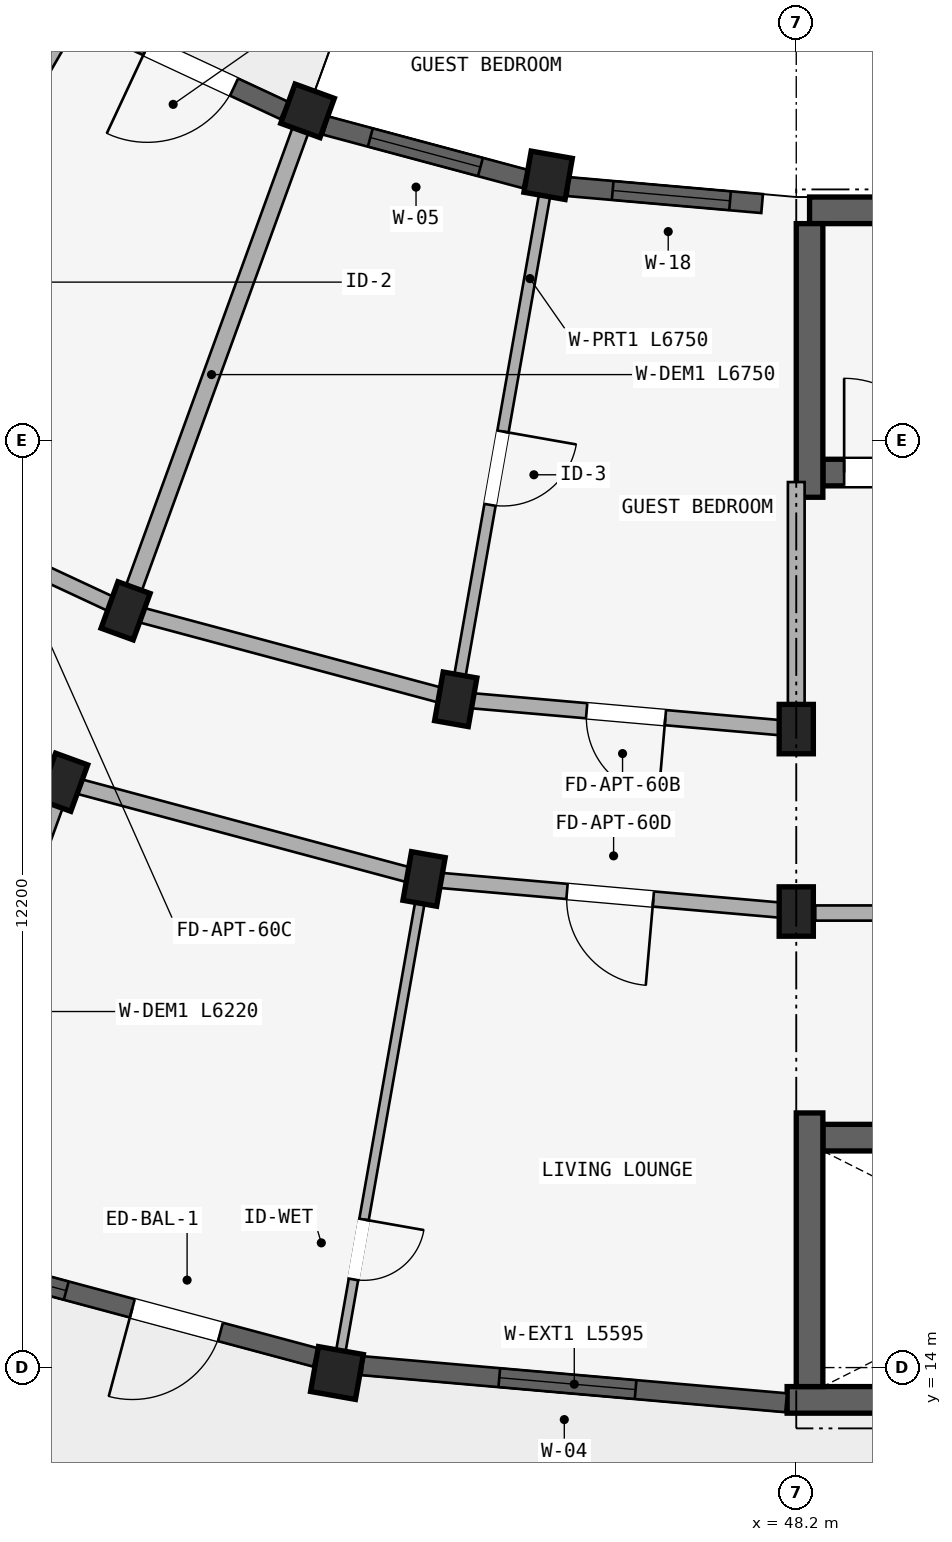
"""IFC4 building model, lengths in metres.
Left out: names, types, materials, properties, quantities, classifications, styles, units other than length and angle.
Written with IfcOpenShell. Run it as: python <this file> out.ifc"""

import sys

from ifc_helpers import new_model, si_unit, direction, frame, frame_2d, origin, origin_2d, place, context, subcontext, project, spatial, rectangle, extrude, element, fill, save


model = new_model("IFC4")
c1 = context("Model", 3, precision=1e-05, world=origin(), true_north=direction((0.0, 1.0)))
c2 = subcontext(c1, "Body", "Model", "MODEL_VIEW")
j1 = project(units=[si_unit("LENGTHUNIT", "METRE"), si_unit("PLANEANGLEUNIT", "RADIAN")], contexts=[c1])
p1 = place(None, origin())
s1 = spatial("IfcSite", under=j1, at=p1, CompositionType="ELEMENT")
p2 = place(p1, origin())
s2 = spatial("IfcBuilding", under=s1, at=p2, CompositionType="ELEMENT")
p3 = place(p2, frame((0.0, 0.0, 30.75)))
s3 = spatial("IfcBuildingStorey", under=s2, at=p3, CompositionType="ELEMENT", Elevation=30.75)
p4 = place(p3, frame((48.08, 13.575, 0.0), z_axis=(0.0, 0.0, 1.0), x_axis=(1.0, 0.0, 0.0)))
e1 = element("IfcWall", 1, at=p4, inside=s3, PredefinedType="SHEAR", context=c2, shape_type="SweptSolid", body=[
    extrude(rectangle(XDim=8.545, YDim=0.35, at=frame_2d((4.272, 0.0))), origin(), (0.0, 0.0, 1.0), 2.91),
])
p5 = place(p3, frame((48.55, 17.025, 0.0), z_axis=(0.0, 0.0, 1.0), x_axis=(1.0, 0.0, 0.0)))
e2 = element("IfcWall", 2, at=p5, inside=s3, PredefinedType="SHEAR", context=c2, shape_type="SweptSolid", body=[
    extrude(rectangle(XDim=8.075, YDim=0.35, at=frame_2d((4.038, 0.0))), origin(), (0.0, 0.0, 1.0), 2.91),
])
p6 = place(p5, frame((6.38, 0.0, 0.0)))
e3 = element("IfcOpeningElement", 3, at=p6, cuts=e2, PredefinedType="OPENING", context=c2, shape_type="SweptSolid", body=[
    extrude(rectangle(XDim=1.24, YDim=2.15, at=frame_2d((0.62, 1.075))), frame((0.0, 0.185, 0.0), z_axis=(0.0, -1.0, 0.0), x_axis=(1.0, 0.0, 0.0)), (0.0, 0.0, 1.0), 0.37),
])
p7 = place(p3, frame((48.375, 17.35, 0.0), z_axis=(0.0, 0.0, 1.0), x_axis=(0.0, -1.0, 0.0)))
e4 = element("IfcWall", 4, at=p7, inside=s3, PredefinedType="SHEAR", context=c2, shape_type="SweptSolid", body=[
    extrude(rectangle(XDim=3.6, YDim=0.35, at=frame_2d((1.8, 0.0))), origin(), (0.0, 0.0, 1.0), 2.91),
])
p8 = place(p3, frame((48.375, 29.225, 0.0), z_axis=(0.0, 0.0, 1.0), x_axis=(1.0, 0.0, 0.0)))
e5 = element("IfcWall", 5, at=p8, inside=s3, PredefinedType="SHEAR", context=c2, shape_type="SweptSolid", body=[
    extrude(rectangle(XDim=8.25, YDim=0.35, at=frame_2d((4.125, 0.0))), origin(), (0.0, 0.0, 1.0), 2.91),
])
p9 = place(p3, frame((48.55, 25.775, 0.0), z_axis=(0.0, 0.0, 1.0), x_axis=(1.0, 0.0, 0.0)))
e6 = element("IfcWall", 6, at=p9, inside=s3, PredefinedType="SHEAR", context=c2, shape_type="SweptSolid", body=[
    extrude(rectangle(XDim=7.9, YDim=0.35, at=frame_2d((3.95, 0.0))), origin(), (0.0, 0.0, 1.0), 2.91),
])
p10 = place(p9, frame((0.28, 0.0, 0.0)))
e7 = element("IfcOpeningElement", 7, at=p10, cuts=e6, PredefinedType="OPENING", context=c2, shape_type="SweptSolid", body=[
    extrude(rectangle(XDim=1.24, YDim=2.15, at=frame_2d((0.62, 1.075))), frame((0.0, 0.185, 0.0), z_axis=(0.0, -1.0, 0.0), x_axis=(1.0, 0.0, 0.0)), (0.0, 0.0, 1.0), 0.37),
])
p11 = place(p3, frame((48.375, 29.05, 0.0), z_axis=(0.0, 0.0, 1.0), x_axis=(0.0, -1.0, 0.0)))
e8 = element("IfcWall", 8, at=p11, inside=s3, PredefinedType="SHEAR", context=c2, shape_type="SweptSolid", body=[
    extrude(rectangle(XDim=3.6, YDim=0.35, at=frame_2d((1.8, 0.0))), origin(), (0.0, 0.0, 1.0), 2.91),
])
for number, where, z_axis, x_axis in (
    (9, (48.2, 22.4, 0.0), (0.0, 0.0, 1.0), (1.0, 0.0, 0.0)),
    (10, (48.2, 20.0, 0.0), (0.0, 0.0, 1.0), (1.0, 0.0, 0.0)),
):
    element("IfcColumn", number, at=place(p3, frame(where, z_axis=z_axis, x_axis=x_axis)), inside=s3, PredefinedType="COLUMN", context=c2, shape_type="SweptSolid", body=[
        extrude(rectangle(XDim=0.45, YDim=0.65, at=origin_2d()), origin(), (0.0, 0.0, 1.0), 2.91),
    ])
p12 = place(p3, frame((44.935, 29.686, 0.0), z_axis=(0.0, 0.0, 1.0), x_axis=(-0.984807753012, 0.173648177667, 0.0)))
e11 = element("IfcColumn", 11, at=p12, inside=s3, PredefinedType="COLUMN", context=c2, shape_type="SweptSolid", body=[
    extrude(rectangle(XDim=0.55, YDim=0.55, at=origin_2d()), origin(), (0.0, 0.0, 1.0), 2.91),
])
for number, where, z_axis, x_axis in (
    (12, (43.72, 22.792, 0.0), (0.0, 0.0, 1.0), (-0.985, 0.174, 0.0)),
    (13, (43.303, 20.428, 0.0), (0.0, 0.0, 1.0), (-0.985, 0.174, 0.0)),
):
    element("IfcColumn", number, at=place(p3, frame(where, z_axis=z_axis, x_axis=x_axis)), inside=s3, PredefinedType="COLUMN", context=c2, shape_type="SweptSolid", body=[
        extrude(rectangle(XDim=0.45, YDim=0.65, at=origin_2d()), origin(), (0.0, 0.0, 1.0), 2.91),
    ])
p13 = place(p3, frame((42.157, 13.929, 0.0), z_axis=(0.0, 0.0, 1.0), x_axis=(-0.984807753012, 0.173648177667, 0.0)))
e14 = element("IfcColumn", 14, at=p13, inside=s3, PredefinedType="COLUMN", context=c2, shape_type="SweptSolid", body=[
    extrude(rectangle(XDim=0.6, YDim=0.6, at=origin_2d()), origin(), (0.0, 0.0, 1.0), 2.91),
])
p14 = place(p3, frame((41.77, 30.534, 0.0), z_axis=(0.0, 0.0, 1.0), x_axis=(-0.939692620786, 0.342020143326, 0.0)))
e15 = element("IfcColumn", 15, at=p14, inside=s3, PredefinedType="COLUMN", context=c2, shape_type="SweptSolid", body=[
    extrude(rectangle(XDim=0.55, YDim=0.55, at=origin_2d()), origin(), (0.0, 0.0, 1.0), 2.91),
])
for number, where, z_axis, x_axis in (
    (16, (39.376, 23.956, 0.0), (0.0, 0.0, 1.0), (-0.94, 0.342, 0.0)),
    (17, (38.555, 21.701, 0.0), (0.0, 0.0, 1.0), (-0.94, 0.342, 0.0)),
):
    element("IfcColumn", number, at=place(p3, frame(where, z_axis=z_axis, x_axis=x_axis)), inside=s3, PredefinedType="COLUMN", context=c2, shape_type="SweptSolid", body=[
        extrude(rectangle(XDim=0.45, YDim=0.65, at=origin_2d()), origin(), (0.0, 0.0, 1.0), 2.91),
    ])
p15 = place(p3, frame((48.45, 19.98, 0.0), z_axis=(0.0, 0.0, 1.0), x_axis=(1.0, 0.0, 0.0)))
e18 = element("IfcWall", 18, at=p15, inside=s3, PredefinedType="STANDARD", context=c2, shape_type="SweptSolid", body=[
    extrude(rectangle(XDim=5.25, YDim=0.2, at=frame_2d((2.625, 0.0))), origin(), (0.0, 0.0, 1.0), 2.352),
])
p16 = place(p15, frame((2.165, 0.0, 0.0)))
e19 = element("IfcOpeningElement", 19, at=p16, cuts=e18, PredefinedType="OPENING", context=c2, shape_type="SweptSolid", body=[
    extrude(rectangle(XDim=0.92, YDim=2.1, at=frame_2d((0.46, 1.05))), frame((0.0, 0.11, 0.0), z_axis=(0.0, -1.0, 0.0), x_axis=(1.0, 0.0, 0.0)), (0.0, 0.0, 1.0), 0.22),
])
p17 = place(p3, frame((48.2, 22.4, 0.0), z_axis=(0.0, 0.0, 1.0), x_axis=(-0.996191949488, 0.087187153726, 0.0)))
e20 = element("IfcWall", 20, at=p17, inside=s3, PredefinedType="STANDARD", context=c2, shape_type="SweptSolid", body=[
    extrude(rectangle(XDim=4.497, YDim=0.2, at=frame_2d((2.249, 0.0))), origin(), (0.0, 0.0, 1.0), 2.352),
])
p18 = place(p17, frame((1.729, 0.0, 0.0)))
e21 = element("IfcOpeningElement", 21, at=p18, cuts=e20, PredefinedType="OPENING", context=c2, shape_type="SweptSolid", body=[
    extrude(rectangle(XDim=1.04, YDim=2.15, at=frame_2d((0.52, 1.075))), frame((0.0, 0.11, 0.0), z_axis=(0.0, -1.0, 0.0), x_axis=(1.0, 0.0, 0.0)), (0.0, 0.0, 1.0), 0.22),
])
p19 = place(p3, frame((48.2, 20.0, 0.0), z_axis=(0.0, 0.0, 1.0), x_axis=(-0.996193663584, 0.087167566415, 0.0)))
e22 = element("IfcWall", 22, at=p19, inside=s3, PredefinedType="STANDARD", context=c2, shape_type="SweptSolid", body=[
    extrude(rectangle(XDim=4.916, YDim=0.2, at=frame_2d((2.458, 0.0))), origin(), (0.0, 0.0, 1.0), 2.352),
])
p20 = place(p19, frame((1.888, 0.0, 0.0)))
e23 = element("IfcOpeningElement", 23, at=p20, cuts=e22, PredefinedType="OPENING", context=c2, shape_type="SweptSolid", body=[
    extrude(rectangle(XDim=1.14, YDim=2.15, at=frame_2d((0.57, 1.075))), frame((0.0, 0.11, 0.0), z_axis=(0.0, -1.0, 0.0), x_axis=(1.0, 0.0, 0.0)), (0.0, 0.0, 1.0), 0.22),
])
p21 = place(p3, frame((43.72, 22.792, 0.0), z_axis=(0.0, 0.0, 1.0), x_axis=(-0.965934240054, 0.258787642463, 0.0)))
e24 = element("IfcWall", 24, at=p21, inside=s3, PredefinedType="STANDARD", context=c2, shape_type="SweptSolid", body=[
    extrude(rectangle(XDim=4.497, YDim=0.2, at=frame_2d((2.249, 0.0))), origin(), (0.0, 0.0, 1.0), 2.352),
])
p22 = place(p3, frame((43.303, 20.428, 0.0), z_axis=(0.0, 0.0, 1.0), x_axis=(-0.965930095386, 0.258803112091, 0.0)))
e25 = element("IfcWall", 25, at=p22, inside=s3, PredefinedType="STANDARD", context=c2, shape_type="SweptSolid", body=[
    extrude(rectangle(XDim=4.916, YDim=0.2, at=frame_2d((2.458, 0.0))), origin(), (0.0, 0.0, 1.0), 2.352),
])
p23 = place(p3, frame((39.376, 23.956, 0.0), z_axis=(0.0, 0.0, 1.0), x_axis=(-0.906307919131, 0.422617978463, 0.0)))
e26 = element("IfcWall", 26, at=p23, inside=s3, PredefinedType="STANDARD", context=c2, shape_type="SweptSolid", body=[
    extrude(rectangle(XDim=4.497, YDim=0.2, at=frame_2d((2.249, 0.0))), origin(), (0.0, 0.0, 1.0), 2.352),
])
p24 = place(p23, frame((1.709, 0.0, 0.0)))
e27 = element("IfcOpeningElement", 27, at=p24, cuts=e26, PredefinedType="OPENING", context=c2, shape_type="SweptSolid", body=[
    extrude(rectangle(XDim=1.08, YDim=2.15, at=frame_2d((0.54, 1.075))), frame((0.0, 0.11, 0.0), z_axis=(0.0, -1.0, 0.0), x_axis=(1.0, 0.0, 0.0)), (0.0, 0.0, 1.0), 0.22),
])
p25 = place(p3, frame((38.555, 21.701, 0.0), z_axis=(0.0, 0.0, 1.0), x_axis=(-0.906302381024, 0.422629854778, 0.0)))
e28 = element("IfcWall", 28, at=p25, inside=s3, PredefinedType="STANDARD", context=c2, shape_type="SweptSolid", body=[
    extrude(rectangle(XDim=4.915, YDim=0.2, at=frame_2d((2.458, 0.0))), origin(), (0.0, 0.0, 1.0), 2.352),
])
p26 = place(p25, frame((1.958, 0.0, 0.0)))
e29 = element("IfcOpeningElement", 29, at=p26, cuts=e28, PredefinedType="OPENING", context=c2, shape_type="SweptSolid", body=[
    extrude(rectangle(XDim=1.0, YDim=2.15, at=frame_2d((0.5, 1.075))), frame((0.0, 0.11, 0.0), z_axis=(0.0, -1.0, 0.0), x_axis=(1.0, 0.0, 0.0)), (0.0, 0.0, 1.0), 0.22),
])
p27 = place(p3, frame((48.2, 25.65, 0.0), z_axis=(0.0, 0.0, 1.0), x_axis=(0.0, -1.0, 0.0)))
e30 = element("IfcWall", 30, at=p27, inside=s3, PredefinedType="STANDARD", context=c2, shape_type="SweptSolid", body=[
    extrude(rectangle(XDim=3.2, YDim=0.22, at=frame_2d((1.6, 0.0))), origin(), (0.0, 0.0, 1.0), 2.352),
])
p28 = place(p3, frame((44.901, 29.489, 0.0), z_axis=(0.0, 0.0, 1.0), x_axis=(-0.173647089161, -0.984807944945, 0.0)))
e31 = element("IfcWall", 31, at=p28, inside=s3, PredefinedType="PARTITIONING", context=c2, shape_type="SweptSolid", body=[
    extrude(rectangle(XDim=6.75, YDim=0.15, at=frame_2d((3.375, 0.0))), origin(), (0.0, 0.0, 1.0), 2.352),
])
p29 = place(p28, frame((3.222, 0.0, 0.0)))
e32 = element("IfcOpeningElement", 32, at=p29, cuts=e31, PredefinedType="OPENING", context=c2, shape_type="SweptSolid", body=[
    extrude(rectangle(XDim=0.98, YDim=2.12, at=frame_2d((0.49, 1.06))), frame((0.0, 0.085, 0.0), z_axis=(0.0, -1.0, 0.0), x_axis=(1.0, 0.0, 0.0)), (0.0, 0.0, 1.0), 0.17),
])
p30 = place(p3, frame((43.286, 20.33, 0.0), z_axis=(0.0, 0.0, 1.0), x_axis=(-0.173646504755, -0.98480804799, 0.0)))
e33 = element("IfcWall", 33, at=p30, inside=s3, PredefinedType="PARTITIONING", context=c2, shape_type="SweptSolid", body=[
    extrude(rectangle(XDim=6.22, YDim=0.125, at=frame_2d((3.11, 0.0))), origin(), (0.0, 0.0, 1.0), 2.352),
])
p31 = place(p30, frame((4.45, 0.0, 0.0)))
e34 = element("IfcOpeningElement", 34, at=p31, cuts=e33, PredefinedType="OPENING", context=c2, shape_type="SweptSolid", body=[
    extrude(rectangle(XDim=0.8, YDim=2.1, at=frame_2d((0.4, 1.05))), frame((0.0, 0.073, 0.0), z_axis=(0.0, -1.0, 0.0), x_axis=(1.0, 0.0, 0.0)), (0.0, 0.0, 1.0), 0.145),
])
p32 = place(p3, frame((41.702, 30.346, 0.0), z_axis=(0.0, 0.0, 1.0), x_axis=(-0.342010221662, -0.939696231917, 0.0)))
e35 = element("IfcWall", 35, at=p32, inside=s3, PredefinedType="STANDARD", context=c2, shape_type="SweptSolid", body=[
    extrude(rectangle(XDim=6.75, YDim=0.22, at=frame_2d((3.375, 0.0))), origin(), (0.0, 0.0, 1.0), 2.352),
])
p33 = place(p3, frame((38.521, 21.607, 0.0), z_axis=(0.0, 0.0, 1.0), x_axis=(-0.341992021352, -0.939702855871, 0.0)))
e36 = element("IfcWall", 36, at=p33, inside=s3, PredefinedType="STANDARD", context=c2, shape_type="SweptSolid", body=[
    extrude(rectangle(XDim=6.22, YDim=0.22, at=frame_2d((3.11, 0.0))), origin(), (0.0, 0.0, 1.0), 2.352),
])
p34 = place(p3, frame((38.7, 31.746, 0.0), z_axis=(0.0, 0.0, 1.0), x_axis=(-0.499997969693, -0.866026575979, 0.0)))
e37 = element("IfcWall", 37, at=p34, inside=s3, PredefinedType="PARTITIONING", context=c2, shape_type="SweptSolid", body=[
    extrude(rectangle(XDim=6.75, YDim=0.15, at=frame_2d((3.375, 0.0))), origin(), (0.0, 0.0, 1.0), 2.352),
])
p35 = place(p34, frame((3.242, 0.0, 0.0)))
e38 = element("IfcOpeningElement", 38, at=p35, cuts=e37, PredefinedType="OPENING", context=c2, shape_type="SweptSolid", body=[
    extrude(rectangle(XDim=0.94, YDim=2.1, at=frame_2d((0.47, 1.05))), frame((0.0, 0.085, 0.0), z_axis=(0.0, -1.0, 0.0), x_axis=(1.0, 0.0, 0.0)), (0.0, 0.0, 1.0), 0.17),
])
p36 = place(p3, frame((48.066, 13.537, 0.0), z_axis=(0.0, 0.0, 1.0), x_axis=(-0.996192628107, 0.087179399543, 0.0)))
e39 = element("IfcWall", 39, at=p36, inside=s3, PredefinedType="STANDARD", context=c2, shape_type="SweptSolid", body=[
    extrude(rectangle(XDim=5.595, YDim=0.25, at=frame_2d((2.798, 0.0))), origin(), (0.0, 0.0, 1.0), 2.352),
])
p37 = place(p36, frame((1.988, 0.0, 0.502)))
e40 = element("IfcOpeningElement", 40, at=p37, cuts=e39, PredefinedType="OPENING", context=c2, shape_type="SweptSolid", body=[
    extrude(rectangle(XDim=1.8, YDim=1.65, at=frame_2d((0.9, 0.825))), frame((0.0, 0.135, 0.0), z_axis=(0.0, -1.0, 0.0), x_axis=(1.0, 0.0, 0.0)), (0.0, 0.0, 1.0), 0.27),
])
p38 = place(p3, frame((41.875, 14.134, 0.0), z_axis=(0.0, 0.0, 1.0), x_axis=(-0.965928932241, 0.258807453254, 0.0)))
e41 = element("IfcWall", 41, at=p38, inside=s3, PredefinedType="STANDARD", context=c2, shape_type="SweptSolid", body=[
    extrude(rectangle(XDim=5.415, YDim=0.25, at=frame_2d((2.708, 0.0))), origin(), (0.0, 0.0, 1.0), 2.352),
])
p39 = place(p38, frame((3.395, 0.0, 0.402)))
e42 = element("IfcOpeningElement", 42, at=p39, cuts=e41, PredefinedType="OPENING", context=c2, shape_type="SweptSolid", body=[
    extrude(rectangle(XDim=1.2, YDim=1.5, at=frame_2d((0.6, 0.75))), frame((0.0, 0.135, 0.0), z_axis=(0.0, -1.0, 0.0), x_axis=(1.0, 0.0, 0.0)), (0.0, 0.0, 1.0), 0.27),
])
p40 = place(p38, frame((1.295, 0.0, 0.0)))
e43 = element("IfcOpeningElement", 43, at=p40, cuts=e41, PredefinedType="OPENING", context=c2, shape_type="SweptSolid", body=[
    extrude(rectangle(XDim=1.2, YDim=2.15, at=frame_2d((0.6, 1.075))), frame((0.0, 0.135, 0.0), z_axis=(0.0, -1.0, 0.0), x_axis=(1.0, 0.0, 0.0)), (0.0, 0.0, 1.0), 0.27),
])
p41 = place(p3, frame((47.751, 29.314, 0.0), z_axis=(0.0, 0.0, 1.0), x_axis=(-0.996188847542, 0.087222589008, 0.0)))
e44 = element("IfcWall", 44, at=p41, inside=s3, PredefinedType="STANDARD", context=c2, shape_type="SweptSolid", body=[
    extrude(rectangle(XDim=2.558, YDim=0.25, at=frame_2d((1.279, 0.0))), origin(), (0.0, 0.0, 1.0), 2.402),
])
p42 = place(p41, frame((0.424, 0.0, 0.602)))
e45 = element("IfcOpeningElement", 45, at=p42, cuts=e44, PredefinedType="OPENING", context=c2, shape_type="SweptSolid", body=[
    extrude(rectangle(XDim=1.55, YDim=1.6, at=frame_2d((0.775, 0.8))), frame((0.0, 0.135, 0.0), z_axis=(0.0, -1.0, 0.0), x_axis=(1.0, 0.0, 0.0)), (0.0, 0.0, 1.0), 0.27),
])
p43 = place(p3, frame((44.634, 29.637, 0.0), z_axis=(0.0, 0.0, 1.0), x_axis=(-0.965928818058, 0.258807879411, 0.0)))
e46 = element("IfcWall", 46, at=p43, inside=s3, PredefinedType="STANDARD", context=c2, shape_type="SweptSolid", body=[
    extrude(rectangle(XDim=2.72, YDim=0.25, at=frame_2d((1.36, 0.0))), origin(), (0.0, 0.0, 1.0), 2.402),
])
p44 = place(p43, frame((0.61, 0.0, 0.552)))
e47 = element("IfcOpeningElement", 47, at=p44, cuts=e46, PredefinedType="OPENING", context=c2, shape_type="SweptSolid", body=[
    extrude(rectangle(XDim=1.5, YDim=1.65, at=frame_2d((0.75, 0.825))), frame((0.0, 0.135, 0.0), z_axis=(0.0, -1.0, 0.0), x_axis=(1.0, 0.0, 0.0)), (0.0, 0.0, 1.0), 0.27),
])
p45 = place(p3, frame((41.465, 30.538, 0.0), z_axis=(0.0, 0.0, 1.0), x_axis=(-0.906302358412, 0.422629903269, 0.0)))
e48 = element("IfcWall", 48, at=p45, inside=s3, PredefinedType="STANDARD", context=c2, shape_type="SweptSolid", body=[
    extrude(rectangle(XDim=2.72, YDim=0.25, at=frame_2d((1.36, 0.0))), origin(), (0.0, 0.0, 1.0), 2.402),
])
p46 = place(p45, frame((0.73, 0.0, 0.0)))
e49 = element("IfcOpeningElement", 49, at=p46, cuts=e48, PredefinedType="OPENING", context=c2, shape_type="SweptSolid", body=[
    extrude(rectangle(XDim=1.26, YDim=2.15, at=frame_2d((0.63, 1.075))), frame((0.0, 0.135, 0.0), z_axis=(0.0, -1.0, 0.0), x_axis=(1.0, 0.0, 0.0)), (0.0, 0.0, 1.0), 0.27),
])
p47 = place(p37, origin())
e50 = element("IfcWindow", 50, at=p47, inside=s3, PartitioningType="DOUBLE_PANEL_VERTICAL", PredefinedType="WINDOW", context=c2, shape_type="SweptSolid", body=[
    extrude(rectangle(XDim=1.8, YDim=1.65, at=frame_2d((0.9, 0.825))), frame((0.0, 0.03, 0.0), z_axis=(0.0, -1.0, 0.0), x_axis=(1.0, 0.0, 0.0)), (0.0, 0.0, 1.0), 0.06),
])
fill(e40, e50)
p48 = place(p39, origin())
e51 = element("IfcWindow", 51, at=p48, inside=s3, PartitioningType="SINGLE_PANEL", PredefinedType="WINDOW", context=c2, shape_type="SweptSolid", body=[
    extrude(rectangle(XDim=1.2, YDim=1.5, at=frame_2d((0.6, 0.75))), frame((0.0, 0.03, 0.0), z_axis=(0.0, -1.0, 0.0), x_axis=(1.0, 0.0, 0.0)), (0.0, 0.0, 1.0), 0.06),
])
fill(e42, e51)
p49 = place(p42, origin())
e52 = element("IfcWindow", 52, at=p49, inside=s3, PartitioningType="DOUBLE_PANEL_VERTICAL", PredefinedType="WINDOW", context=c2, shape_type="SweptSolid", body=[
    extrude(rectangle(XDim=1.55, YDim=1.6, at=frame_2d((0.775, 0.8))), frame((0.0, 0.03, 0.0), z_axis=(0.0, -1.0, 0.0), x_axis=(1.0, 0.0, 0.0)), (0.0, 0.0, 1.0), 0.06),
])
fill(e45, e52)
p50 = place(p44, origin())
e53 = element("IfcWindow", 53, at=p50, inside=s3, PartitioningType="DOUBLE_PANEL_VERTICAL", PredefinedType="WINDOW", context=c2, shape_type="SweptSolid", body=[
    extrude(rectangle(XDim=1.5, YDim=1.65, at=frame_2d((0.75, 0.825))), frame((0.0, 0.03, 0.0), z_axis=(0.0, -1.0, 0.0), x_axis=(1.0, 0.0, 0.0)), (0.0, 0.0, 1.0), 0.06),
])
fill(e47, e53)
p51 = place(p10, origin())
e54 = element("IfcDoor", 54, at=p51, inside=s3, OperationType="SINGLE_SWING_LEFT", PredefinedType="DOOR", context=c2, shape_type="SweptSolid", body=[
    extrude(rectangle(XDim=1.24, YDim=2.15, at=frame_2d((0.62, 1.075))), frame((0.0, 0.025, 0.0), z_axis=(0.0, -1.0, 0.0), x_axis=(1.0, 0.0, 0.0)), (0.0, 0.0, 1.0), 0.05),
])
fill(e7, e54)
p52 = place(p29, frame((0.98, 0.0, 0.0), z_axis=(0.0, 0.0, 1.0), x_axis=(-1.0, 0.0, 0.0)))
e55 = element("IfcDoor", 55, at=p52, inside=s3, OperationType="SINGLE_SWING_RIGHT", PredefinedType="DOOR", context=c2, shape_type="SweptSolid", body=[
    extrude(rectangle(XDim=0.98, YDim=2.12, at=frame_2d((0.49, 1.06))), frame((0.0, 0.025, 0.0), z_axis=(0.0, -1.0, 0.0), x_axis=(1.0, 0.0, 0.0)), (0.0, 0.0, 1.0), 0.05),
])
fill(e32, e55)
p53 = place(p31, origin())
e56 = element("IfcDoor", 56, at=p53, inside=s3, OperationType="SINGLE_SWING_LEFT", PredefinedType="DOOR", context=c2, shape_type="SweptSolid", body=[
    extrude(rectangle(XDim=0.8, YDim=2.1, at=frame_2d((0.4, 1.05))), frame((0.0, 0.025, 0.0), z_axis=(0.0, -1.0, 0.0), x_axis=(1.0, 0.0, 0.0)), (0.0, 0.0, 1.0), 0.05),
])
fill(e34, e56)
p54 = place(p20, origin())
e57 = element("IfcDoor", 57, at=p54, inside=s3, OperationType="SINGLE_SWING_LEFT", PredefinedType="DOOR", context=c2, shape_type="SweptSolid", body=[
    extrude(rectangle(XDim=1.14, YDim=2.15, at=frame_2d((0.57, 1.075))), frame((0.0, 0.025, 0.0), z_axis=(0.0, -1.0, 0.0), x_axis=(1.0, 0.0, 0.0)), (0.0, 0.0, 1.0), 0.05),
])
fill(e23, e57)
p55 = place(p18, frame((1.04, 0.0, 0.0), z_axis=(0.0, 0.0, 1.0), x_axis=(-1.0, 0.0, 0.0)))
e58 = element("IfcDoor", 58, at=p55, inside=s3, OperationType="SINGLE_SWING_RIGHT", PredefinedType="DOOR", context=c2, shape_type="SweptSolid", body=[
    extrude(rectangle(XDim=1.04, YDim=2.15, at=frame_2d((0.52, 1.075))), frame((0.0, 0.025, 0.0), z_axis=(0.0, -1.0, 0.0), x_axis=(1.0, 0.0, 0.0)), (0.0, 0.0, 1.0), 0.05),
])
fill(e21, e58)
p56 = place(p40, origin())
e59 = element("IfcDoor", 59, at=p56, inside=s3, OperationType="SINGLE_SWING_RIGHT", PredefinedType="DOOR", context=c2, shape_type="SweptSolid", body=[
    extrude(rectangle(XDim=1.2, YDim=2.15, at=frame_2d((0.6, 1.075))), frame((0.0, 0.025, 0.0), z_axis=(0.0, -1.0, 0.0), x_axis=(1.0, 0.0, 0.0)), (0.0, 0.0, 1.0), 0.05),
])
fill(e43, e59)
p57 = place(p46, frame((1.26, 0.0, 0.0), z_axis=(0.0, 0.0, 1.0), x_axis=(-1.0, 0.0, 0.0)))
e60 = element("IfcDoor", 60, at=p57, inside=s3, OperationType="SINGLE_SWING_LEFT", PredefinedType="DOOR", context=c2, shape_type="SweptSolid", body=[
    extrude(rectangle(XDim=1.26, YDim=2.15, at=frame_2d((0.63, 1.075))), frame((0.0, 0.025, 0.0), z_axis=(0.0, -1.0, 0.0), x_axis=(1.0, 0.0, 0.0)), (0.0, 0.0, 1.0), 0.05),
])
fill(e49, e60)
save(model, sys.argv[1])
